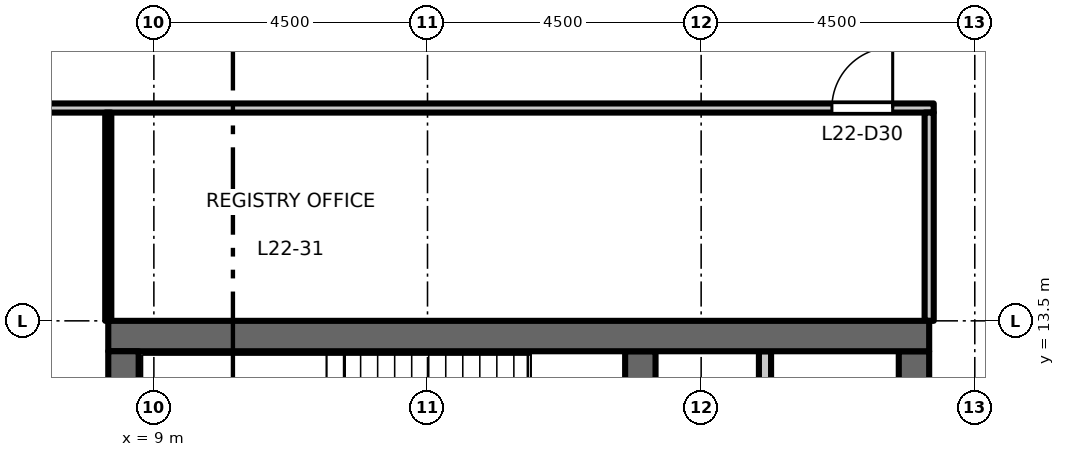
"""IFC4 building model, lengths in metres.
Left out: names, types, materials, properties, quantities, classifications, styles, units other than length and angle.
Written with IfcOpenShell. Run it as: python <this file> out.ifc"""

import sys

from ifc_helpers import new_model, si_unit, direction, frame, frame_2d, origin, place, context, subcontext, project, spatial, rectangle, extrude, element, fill, save


model = new_model("IFC4")
c1 = context("Model", 3, precision=1e-05, world=origin(), true_north=direction((0.0, 1.0)))
c2 = subcontext(c1, "Body", "Model", "MODEL_VIEW")
j1 = project(units=[si_unit("LENGTHUNIT", "METRE"), si_unit("PLANEANGLEUNIT", "RADIAN")], contexts=[c1])
p1 = place(None, origin())
s1 = spatial("IfcSite", under=j1, at=p1, CompositionType="ELEMENT")
p2 = place(p1, origin())
s2 = spatial("IfcBuilding", under=s1, at=p2, CompositionType="ELEMENT")
p3 = place(p2, frame((0.0, 0.0, 104.7)))
s3 = spatial("IfcBuildingStorey", under=s2, at=p3, CompositionType="ELEMENT", Elevation=104.7)
p4 = place(p3, frame((21.5, -13.0, 0.0), z_axis=(0.0, 0.0, 1.0), x_axis=(0.0, 1.0, 0.0)))
e1 = element("IfcWall", 1, at=p4, inside=s3, PredefinedType="SHEAR", context=c2, shape_type="SweptSolid", body=[
    extrude(rectangle(XDim=26.0, YDim=0.5, at=frame_2d((13.0, 0.0))), origin(), (0.0, 0.0, 1.0), 4.35),
])
p5 = place(p4, frame((16.825, 0.0, 0.0)))
e2 = element("IfcOpeningElement", 2, at=p5, cuts=e1, PredefinedType="OPENING", context=c2, shape_type="SweptSolid", body=[
    extrude(rectangle(XDim=1.8, YDim=2.1, at=frame_2d((0.9, 1.05))), frame((0.0, 0.26, 0.0), z_axis=(0.0, -1.0, 0.0), x_axis=(1.0, 0.0, 0.0)), (0.0, 0.0, 1.0), 0.52),
])
p6 = place(p4, frame((7.375, 0.0, 0.0)))
e3 = element("IfcOpeningElement", 3, at=p6, cuts=e1, PredefinedType="OPENING", context=c2, shape_type="SweptSolid", body=[
    extrude(rectangle(XDim=1.8, YDim=2.1, at=frame_2d((0.9, 1.05))), frame((0.0, 0.26, 0.0), z_axis=(0.0, -1.0, 0.0), x_axis=(1.0, 0.0, 0.0)), (0.0, 0.0, 1.0), 0.52),
])
p7 = place(p3, frame((19.05, 6.425, 0.0), z_axis=(0.0, 0.0, 1.0), x_axis=(0.0, 1.0, 0.0)))
e4 = element("IfcWall", 4, at=p7, inside=s3, PredefinedType="PARTITIONING", context=c2, shape_type="SweptSolid", body=[
    extrude(rectangle(XDim=6.575, YDim=0.2, at=frame_2d((3.288, 0.0))), origin(), (0.0, 0.0, 1.0), 4.35),
])
p8 = place(p3, frame((17.0, 6.425, 0.0), z_axis=(0.0, 0.0, 1.0), x_axis=(0.0, 1.0, 0.0)))
e5 = element("IfcWall", 5, at=p8, inside=s3, PredefinedType="SHEAR", context=c2, shape_type="SweptSolid", body=[
    extrude(rectangle(XDim=6.575, YDim=0.5, at=frame_2d((3.288, 0.0))), origin(), (0.0, 0.0, 1.0), 4.35),
])
p9 = place(p3, frame((8.25, 13.25, 0.0), z_axis=(0.0, 0.0, 1.0), x_axis=(1.0, 0.0, 0.0)))
e6 = element("IfcWall", 6, at=p9, inside=s3, PredefinedType="SHEAR", context=c2, shape_type="SweptSolid", body=[
    extrude(rectangle(XDim=13.5, YDim=0.5, at=frame_2d((6.75, 0.0))), origin(), (0.0, 0.0, 1.0), 4.35),
])
p10 = place(p3, frame((8.5, -13.0, 0.0), z_axis=(0.0, 0.0, 1.0), x_axis=(0.0, 1.0, 0.0)))
e7 = element("IfcWall", 7, at=p10, inside=s3, PredefinedType="SHEAR", context=c2, shape_type="SweptSolid", body=[
    extrude(rectangle(XDim=26.0, YDim=0.5, at=frame_2d((13.0, 0.0))), origin(), (0.0, 0.0, 1.0), 4.35),
])
p11 = place(p3, frame((-21.825, 17.0, 0.0), z_axis=(0.0, 0.0, 1.0), x_axis=(1.0, 0.0, 0.0)))
e8 = element("IfcWall", 8, at=p11, inside=s3, PredefinedType="PARTITIONING", context=c2, shape_type="SweptSolid", body=[
    extrude(rectangle(XDim=43.65, YDim=0.15, at=frame_2d((21.825, 0.0))), origin(), (0.0, 0.0, 1.0), 4.35),
])
p12 = place(p11, frame((20.225, 0.0, 0.0)))
e9 = element("IfcOpeningElement", 9, at=p12, cuts=e8, PredefinedType="OPENING", context=c2, shape_type="SweptSolid", body=[
    extrude(rectangle(XDim=1.0, YDim=2.1, at=frame_2d((0.5, 1.05))), frame((0.0, 0.085, 0.0), z_axis=(0.0, -1.0, 0.0), x_axis=(1.0, 0.0, 0.0)), (0.0, 0.0, 1.0), 0.17),
])
p13 = place(p11, frame((22.475, 0.0, 0.0)))
e10 = element("IfcOpeningElement", 10, at=p13, cuts=e8, PredefinedType="OPENING", context=c2, shape_type="SweptSolid", body=[
    extrude(rectangle(XDim=1.0, YDim=2.1, at=frame_2d((0.5, 1.05))), frame((0.0, 0.085, 0.0), z_axis=(0.0, -1.0, 0.0), x_axis=(1.0, 0.0, 0.0)), (0.0, 0.0, 1.0), 0.17),
])
p14 = place(p11, frame((0.725, 0.0, 0.0)))
e11 = element("IfcOpeningElement", 11, at=p14, cuts=e8, PredefinedType="OPENING", context=c2, shape_type="SweptSolid", body=[
    extrude(rectangle(XDim=1.0, YDim=2.1, at=frame_2d((0.5, 1.05))), frame((0.0, 0.085, 0.0), z_axis=(0.0, -1.0, 0.0), x_axis=(1.0, 0.0, 0.0)), (0.0, 0.0, 1.0), 0.17),
])
p15 = place(p11, frame((41.975, 0.0, 0.0)))
e12 = element("IfcOpeningElement", 12, at=p15, cuts=e8, PredefinedType="OPENING", context=c2, shape_type="SweptSolid", body=[
    extrude(rectangle(XDim=1.0, YDim=2.1, at=frame_2d((0.5, 1.05))), frame((0.0, 0.085, 0.0), z_axis=(0.0, -1.0, 0.0), x_axis=(1.0, 0.0, 0.0)), (0.0, 0.0, 1.0), 0.17),
])
p16 = place(p3, frame((8.25, 13.5, 0.0), z_axis=(0.0, 0.0, 1.0), x_axis=(0.0, 1.0, 0.0)))
e13 = element("IfcWall", 13, at=p16, inside=s3, PredefinedType="PARTITIONING", context=c2, shape_type="SweptSolid", body=[
    extrude(rectangle(XDim=3.425, YDim=0.1, at=frame_2d((1.712, 0.0))), origin(), (0.0, 0.0, 1.0), 4.35),
])
p17 = place(p3, frame((21.75, 13.5, 0.0), z_axis=(0.0, 0.0, 1.0), x_axis=(0.0, 1.0, 0.0)))
e14 = element("IfcWall", 14, at=p17, inside=s3, PredefinedType="PARTITIONING", context=c2, shape_type="SweptSolid", body=[
    extrude(rectangle(XDim=3.425, YDim=0.15, at=frame_2d((1.712, 0.0))), origin(), (0.0, 0.0, 1.0), 4.35),
])
p18 = place(p15, origin())
e15 = element("IfcDoor", 15, at=p18, inside=s3, OperationType="SINGLE_SWING_RIGHT", PredefinedType="DOOR", context=c2, shape_type="SweptSolid", body=[
    extrude(rectangle(XDim=1.0, YDim=2.1, at=frame_2d((0.5, 1.05))), frame((0.0, 0.025, 0.0), z_axis=(0.0, -1.0, 0.0), x_axis=(1.0, 0.0, 0.0)), (0.0, 0.0, 1.0), 0.05),
])
fill(e12, e15)
save(model, sys.argv[1])
